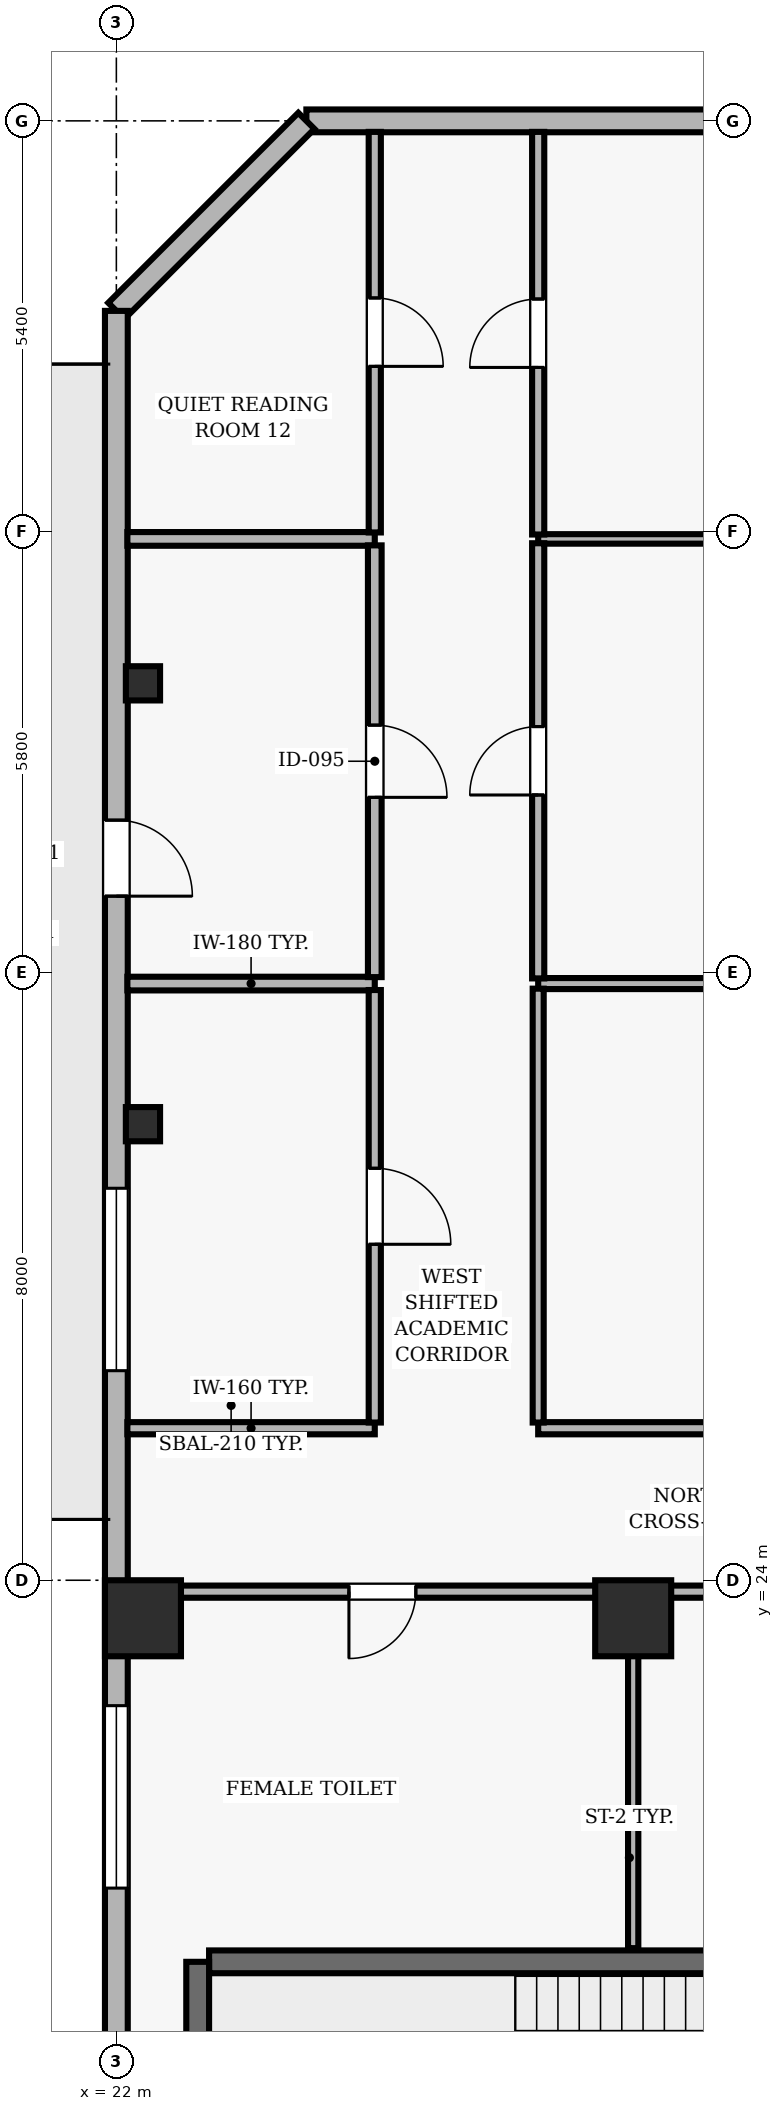
"""IFC4 building model, lengths in metres.
Left out: names, types, materials, properties, quantities, classifications, styles, units other than length and angle.
Written with IfcOpenShell. Run it as: python <this file> out.ifc"""

import sys

from ifc_helpers import new_model, si_unit, direction, frame, frame_2d, origin, origin_2d, place, context, subcontext, project, spatial, rectangle, hollow_rectangle, extrude, element, fill, save


model = new_model("IFC4")
c1 = context("Model", 3, precision=1e-05, world=origin(), true_north=direction((0.0, 1.0)))
c2 = subcontext(c1, "Body", "Model", "MODEL_VIEW")
j1 = project(units=[si_unit("LENGTHUNIT", "METRE"), si_unit("PLANEANGLEUNIT", "RADIAN")], contexts=[c1])
p1 = place(None, origin())
s1 = spatial("IfcSite", under=j1, at=p1, CompositionType="ELEMENT")
p2 = place(p1, origin())
s2 = spatial("IfcBuilding", under=s1, at=p2, CompositionType="ELEMENT")
p3 = place(p2, frame((0.0, 0.0, 179.7)))
s3 = spatial("IfcBuildingStorey", under=s2, at=p3, CompositionType="ELEMENT", Elevation=179.7)
for number, where, z_axis, x_axis in (
    (1, (22.35, 23.5, 0.0), (0.0, 0.0, 1.0), (1.0, 0.0, 0.0)),
    (2, (28.8, 23.5, 0.0), (0.0, 0.0, 1.0), (1.0, 0.0, 0.0)),
):
    element("IfcColumn", number, at=place(p3, frame(where, z_axis=z_axis, x_axis=x_axis)), inside=s3, PredefinedType="COLUMN", context=c2, shape_type="SweptSolid", body=[
        extrude(rectangle(XDim=1.0, YDim=1.0, at=origin_2d()), origin(), (0.0, 0.0, 1.0), 3.9),
    ])
for number, where, z_axis, x_axis in (
    (3, (22.35, 30.0, 0.0), (0.0, 0.0, 1.0), (1.0, 0.0, 0.0)),
    (4, (22.35, 35.8, 0.0), (0.0, 0.0, 1.0), (1.0, 0.0, 0.0)),
):
    element("IfcColumn", number, at=place(p3, frame(where, z_axis=z_axis, x_axis=x_axis)), inside=s3, PredefinedType="COLUMN", context=c2, shape_type="SweptSolid", body=[
        extrude(hollow_rectangle(XDim=0.45, YDim=0.45, WallThickness=0.02, at=origin_2d()), origin(), (0.0, 0.0, 1.0), 3.9),
    ])
p4 = place(p3, frame((35.5, 43.2, 0.0), z_axis=(0.0, 0.0, 1.0), x_axis=(-1.0, 0.0, 0.0)))
e5 = element("IfcWall", 5, at=p4, inside=s3, PredefinedType="SOLIDWALL", context=c2, shape_type="SweptSolid", body=[
    extrude(rectangle(XDim=11.0, YDim=0.3, at=frame_2d((5.5, 0.0))), origin(), (0.0, 0.0, 1.0), 3.69),
])
p5 = place(p4, frame((2.0, 0.0, 0.9)))
e6 = element("IfcOpeningElement", 6, at=p5, cuts=e5, PredefinedType="OPENING", context=c2, shape_type="SweptSolid", body=[
    extrude(rectangle(XDim=1.5, YDim=1.8, at=frame_2d((0.75, 0.9))), frame((0.0, 0.16, 0.0), z_axis=(0.0, -1.0, 0.0), x_axis=(1.0, 0.0, 0.0)), (0.0, 0.0, 1.0), 0.32),
])
p6 = place(p3, frame((24.5, 43.2, 0.0), z_axis=(0.0, 0.0, 1.0), x_axis=(-0.707106781187, -0.707106781187, 0.0)))
e7 = element("IfcWall", 7, at=p6, inside=s3, PredefinedType="SOLIDWALL", context=c2, shape_type="SweptSolid", body=[
    extrude(rectangle(XDim=3.536, YDim=0.3, at=frame_2d((1.768, 0.0))), origin(), (0.0, 0.0, 1.0), 3.69),
])
p7 = place(p3, frame((22.0, 40.7, 0.0), z_axis=(0.0, 0.0, 1.0), x_axis=(0.0, -1.0, 0.0)))
e8 = element("IfcWall", 8, at=p7, inside=s3, PredefinedType="SOLIDWALL", context=c2, shape_type="SweptSolid", body=[
    extrude(rectangle(XDim=38.2, YDim=0.3, at=frame_2d((19.1, 0.0))), origin(), (0.0, 0.0, 1.0), 3.69),
])
p8 = place(p7, frame((6.7, 0.0, 0.0)))
e9 = element("IfcOpeningElement", 9, at=p8, cuts=e8, PredefinedType="OPENING", context=c2, shape_type="SweptSolid", body=[
    extrude(rectangle(XDim=1.0, YDim=2.2, at=frame_2d((0.5, 1.1))), frame((0.0, 0.16, 0.0), z_axis=(0.0, -1.0, 0.0), x_axis=(1.0, 0.0, 0.0)), (0.0, 0.0, 1.0), 0.32),
])
p9 = place(p7, frame((11.543, 0.0, 0.9)))
e10 = element("IfcOpeningElement", 10, at=p9, cuts=e8, PredefinedType="OPENING", context=c2, shape_type="SweptSolid", body=[
    extrude(rectangle(XDim=2.4, YDim=1.8, at=frame_2d((1.2, 0.9))), frame((0.0, 0.16, 0.0), z_axis=(0.0, -1.0, 0.0), x_axis=(1.0, 0.0, 0.0)), (0.0, 0.0, 1.0), 0.32),
])
p10 = place(p7, frame((18.35, 0.0, 0.9)))
e11 = element("IfcOpeningElement", 11, at=p10, cuts=e8, PredefinedType="OPENING", context=c2, shape_type="SweptSolid", body=[
    extrude(rectangle(XDim=2.4, YDim=1.8, at=frame_2d((1.2, 0.9))), frame((0.0, 0.16, 0.0), z_axis=(0.0, -1.0, 0.0), x_axis=(1.0, 0.0, 0.0)), (0.0, 0.0, 1.0), 0.32),
])
p11 = place(p7, frame((22.907, 0.0, 0.9)))
e12 = element("IfcOpeningElement", 12, at=p11, cuts=e8, PredefinedType="OPENING", context=c2, shape_type="SweptSolid", body=[
    extrude(rectangle(XDim=2.4, YDim=1.8, at=frame_2d((1.2, 0.9))), frame((0.0, 0.16, 0.0), z_axis=(0.0, -1.0, 0.0), x_axis=(1.0, 0.0, 0.0)), (0.0, 0.0, 1.0), 0.32),
])
p12 = place(p7, frame((28.814, 0.0, 0.9)))
e13 = element("IfcOpeningElement", 13, at=p12, cuts=e8, PredefinedType="OPENING", context=c2, shape_type="SweptSolid", body=[
    extrude(rectangle(XDim=2.4, YDim=1.8, at=frame_2d((1.2, 0.9))), frame((0.0, 0.16, 0.0), z_axis=(0.0, -1.0, 0.0), x_axis=(1.0, 0.0, 0.0)), (0.0, 0.0, 1.0), 0.32),
])
p13 = place(p3, frame((31.58, 18.98, 0.0), z_axis=(0.0, 0.0, 1.0), x_axis=(-1.0, 0.0, 0.0)))
e14 = element("IfcWall", 14, at=p13, inside=s3, PredefinedType="SHEAR", context=c2, shape_type="SweptSolid", body=[
    extrude(rectangle(XDim=8.36, YDim=0.3, at=frame_2d((4.18, 0.0))), origin(), (0.0, 0.0, 1.0), 3.69),
])
p14 = place(p3, frame((23.07, 18.98, 0.0), z_axis=(0.0, 0.0, 1.0), x_axis=(0.0, -1.0, 0.0)))
e15 = element("IfcWall", 15, at=p14, inside=s3, PredefinedType="SHEAR", context=c2, shape_type="SweptSolid", body=[
    extrude(rectangle(XDim=3.51, YDim=0.3, at=frame_2d((1.755, 0.0))), origin(), (0.0, 0.0, 1.0), 3.69),
])
p15 = place(p3, frame((25.4, 26.0, 0.0), z_axis=(0.0, 0.0, 1.0), x_axis=(-1.0, 0.0, 0.0)))
e16 = element("IfcWall", 16, at=p15, inside=s3, PredefinedType="PARTITIONING", context=c2, shape_type="SweptSolid", body=[
    extrude(rectangle(XDim=3.255, YDim=0.16, at=frame_2d((1.627, 0.0))), origin(), (0.0, 0.0, 1.0), 3.69),
])
for number, where, z_axis, x_axis in (
    (17, (25.4, 31.85, 0.0), (0.0, 0.0, 1.0), (-1.0, 0.0, 0.0)),
    (18, (25.4, 37.7, 0.0), (0.0, 0.0, 1.0), (-1.0, 0.0, 0.0)),
):
    element("IfcWall", number, at=place(p3, frame(where, z_axis=z_axis, x_axis=x_axis)), inside=s3, PredefinedType="PARTITIONING", context=c2, shape_type="SweptSolid", body=[
        extrude(rectangle(XDim=3.255, YDim=0.18, at=frame_2d((1.627, 0.0))), origin(), (0.0, 0.0, 1.0), 3.69),
    ])
p16 = place(p3, frame((28.8, 23.85, 0.0), z_axis=(0.0, 0.0, 1.0), x_axis=(-1.0, 0.0, 0.0)))
e19 = element("IfcWall", 19, at=p16, inside=s3, PredefinedType="PARTITIONING", context=c2, shape_type="SweptSolid", body=[
    extrude(rectangle(XDim=6.6, YDim=0.16, at=frame_2d((3.3, 0.0))), origin(), (0.0, 0.0, 1.0), 3.146),
])
p17 = place(p16, frame((2.86, 0.0, 0.0)))
e20 = element("IfcOpeningElement", 20, at=p17, cuts=e19, PredefinedType="OPENING", context=c2, shape_type="SweptSolid", body=[
    extrude(rectangle(XDim=0.88, YDim=2.1, at=frame_2d((0.44, 1.05))), frame((0.0, 0.09, 0.0), z_axis=(0.0, -1.0, 0.0), x_axis=(1.0, 0.0, 0.0)), (0.0, 0.0, 1.0), 0.18),
])
p18 = place(p3, frame((31.65, 23.85, 0.0), z_axis=(0.0, 0.0, 1.0), x_axis=(-1.0, 0.0, 0.0)))
e21 = element("IfcWall", 21, at=p18, inside=s3, PredefinedType="PARTITIONING", context=c2, shape_type="SweptSolid", body=[
    extrude(rectangle(XDim=2.85, YDim=0.16, at=frame_2d((1.425, 0.0))), origin(), (0.0, 0.0, 1.0), 3.146),
])
p19 = place(p3, frame((37.85, 26.0, 0.0), z_axis=(0.0, 0.0, 1.0), x_axis=(-1.0, 0.0, 0.0)))
e22 = element("IfcWall", 22, at=p19, inside=s3, PredefinedType="PARTITIONING", context=c2, shape_type="SweptSolid", body=[
    extrude(rectangle(XDim=10.3, YDim=0.16, at=frame_2d((5.15, 0.0))), origin(), (0.0, 0.0, 1.0), 3.69),
])
p20 = place(p19, frame((4.6, 0.0, 0.0)))
e23 = element("IfcOpeningElement", 23, at=p20, cuts=e22, PredefinedType="OPENING", context=c2, shape_type="SweptSolid", body=[
    extrude(rectangle(XDim=1.1, YDim=2.15, at=frame_2d((0.55, 1.075))), frame((0.0, 0.09, 0.0), z_axis=(0.0, -1.0, 0.0), x_axis=(1.0, 0.0, 0.0)), (0.0, 0.0, 1.0), 0.18),
])
p21 = place(p3, frame((37.85, 31.85, 0.0), z_axis=(0.0, 0.0, 1.0), x_axis=(-1.0, 0.0, 0.0)))
e24 = element("IfcWall", 24, at=p21, inside=s3, PredefinedType="PARTITIONING", context=c2, shape_type="SweptSolid", body=[
    extrude(rectangle(XDim=10.3, YDim=0.145, at=frame_2d((5.15, 0.0))), origin(), (0.0, 0.0, 1.0), 3.69),
])
p22 = place(p3, frame((37.85, 37.7, 0.0), z_axis=(0.0, 0.0, 1.0), x_axis=(-1.0, 0.0, 0.0)))
e25 = element("IfcWall", 25, at=p22, inside=s3, PredefinedType="PARTITIONING", context=c2, shape_type="SweptSolid", body=[
    extrude(rectangle(XDim=10.3, YDim=0.125, at=frame_2d((5.15, 0.0))), origin(), (0.0, 0.0, 1.0), 3.69),
])
p23 = place(p3, frame((25.4, 31.765, 0.0), z_axis=(0.0, 0.0, 1.0), x_axis=(0.0, -1.0, 0.0)))
e26 = element("IfcWall", 26, at=p23, inside=s3, PredefinedType="PARTITIONING", context=c2, shape_type="SweptSolid", body=[
    extrude(rectangle(XDim=5.69, YDim=0.16, at=frame_2d((2.845, 0.0))), origin(), (0.0, 0.0, 1.0), 3.69),
])
p24 = place(p23, frame((2.345, 0.0, 0.0)))
e27 = element("IfcOpeningElement", 27, at=p24, cuts=e26, PredefinedType="OPENING", context=c2, shape_type="SweptSolid", body=[
    extrude(rectangle(XDim=1.0, YDim=2.1, at=frame_2d((0.5, 1.05))), frame((0.0, 0.09, 0.0), z_axis=(0.0, -1.0, 0.0), x_axis=(1.0, 0.0, 0.0)), (0.0, 0.0, 1.0), 0.18),
])
p25 = place(p3, frame((25.4, 37.615, 0.0), z_axis=(0.0, 0.0, 1.0), x_axis=(0.0, -1.0, 0.0)))
e28 = element("IfcWall", 28, at=p25, inside=s3, PredefinedType="PARTITIONING", context=c2, shape_type="SweptSolid", body=[
    extrude(rectangle(XDim=5.68, YDim=0.18, at=frame_2d((2.84, 0.0))), origin(), (0.0, 0.0, 1.0), 3.69),
])
p26 = place(p25, frame((2.365, 0.0, 0.0)))
e29 = element("IfcOpeningElement", 29, at=p26, cuts=e28, PredefinedType="OPENING", context=c2, shape_type="SweptSolid", body=[
    extrude(rectangle(XDim=0.95, YDim=2.1, at=frame_2d((0.475, 1.05))), frame((0.0, 0.1, 0.0), z_axis=(0.0, -1.0, 0.0), x_axis=(1.0, 0.0, 0.0)), (0.0, 0.0, 1.0), 0.2),
])
p27 = place(p3, frame((25.4, 43.055, 0.0), z_axis=(0.0, 0.0, 1.0), x_axis=(0.0, -1.0, 0.0)))
e30 = element("IfcWall", 30, at=p27, inside=s3, PredefinedType="PARTITIONING", context=c2, shape_type="SweptSolid", body=[
    extrude(rectangle(XDim=5.27, YDim=0.16, at=frame_2d((2.635, 0.0))), origin(), (0.0, 0.0, 1.0), 3.69),
])
p28 = place(p27, frame((2.185, 0.0, 0.0)))
e31 = element("IfcOpeningElement", 31, at=p28, cuts=e30, PredefinedType="OPENING", context=c2, shape_type="SweptSolid", body=[
    extrude(rectangle(XDim=0.9, YDim=2.1, at=frame_2d((0.45, 1.05))), frame((0.0, 0.09, 0.0), z_axis=(0.0, -1.0, 0.0), x_axis=(1.0, 0.0, 0.0)), (0.0, 0.0, 1.0), 0.18),
])
p29 = place(p3, frame((27.55, 26.075, 0.0), z_axis=(0.0, 0.0, 1.0), x_axis=(0.0, 1.0, 0.0)))
e32 = element("IfcWall", 32, at=p29, inside=s3, PredefinedType="PARTITIONING", context=c2, shape_type="SweptSolid", body=[
    extrude(rectangle(XDim=5.708, YDim=0.145, at=frame_2d((2.854, 0.0))), origin(), (0.0, 0.0, 1.0), 3.69),
])
p30 = place(p3, frame((27.55, 31.918, 0.0), z_axis=(0.0, 0.0, 1.0), x_axis=(0.0, 1.0, 0.0)))
e33 = element("IfcWall", 33, at=p30, inside=s3, PredefinedType="PARTITIONING", context=c2, shape_type="SweptSolid", body=[
    extrude(rectangle(XDim=5.725, YDim=0.16, at=frame_2d((2.863, 0.0))), origin(), (0.0, 0.0, 1.0), 3.69),
])
p31 = place(p30, frame((2.413, 0.0, 0.0)))
e34 = element("IfcOpeningElement", 34, at=p31, cuts=e33, PredefinedType="OPENING", context=c2, shape_type="SweptSolid", body=[
    extrude(rectangle(XDim=0.9, YDim=2.1, at=frame_2d((0.45, 1.05))), frame((0.0, 0.09, 0.0), z_axis=(0.0, -1.0, 0.0), x_axis=(1.0, 0.0, 0.0)), (0.0, 0.0, 1.0), 0.18),
])
p32 = place(p3, frame((27.55, 37.758, 0.0), z_axis=(0.0, 0.0, 1.0), x_axis=(0.0, 1.0, 0.0)))
e35 = element("IfcWall", 35, at=p32, inside=s3, PredefinedType="PARTITIONING", context=c2, shape_type="SweptSolid", body=[
    extrude(rectangle(XDim=5.297, YDim=0.16, at=frame_2d((2.648, 0.0))), origin(), (0.0, 0.0, 1.0), 3.69),
])
p33 = place(p32, frame((2.198, 0.0, 0.0)))
e36 = element("IfcOpeningElement", 36, at=p33, cuts=e35, PredefinedType="OPENING", context=c2, shape_type="SweptSolid", body=[
    extrude(rectangle(XDim=0.9, YDim=2.1, at=frame_2d((0.45, 1.05))), frame((0.0, 0.09, 0.0), z_axis=(0.0, -1.0, 0.0), x_axis=(1.0, 0.0, 0.0)), (0.0, 0.0, 1.0), 0.18),
])
p34 = place(p3, frame((28.8, 23.775, 0.0), z_axis=(0.0, 0.0, 1.0), x_axis=(0.0, -1.0, 0.0)))
e37 = element("IfcWall", 37, at=p34, inside=s3, PredefinedType="PARTITIONING", context=c2, shape_type="SweptSolid", body=[
    extrude(rectangle(XDim=4.615, YDim=0.135, at=frame_2d((2.308, 0.0))), origin(), (0.0, 0.0, 1.0), 3.69),
])
p35 = place(p8, origin())
e38 = element("IfcDoor", 38, at=p35, inside=s3, OperationType="SINGLE_SWING_RIGHT", PredefinedType="DOOR", context=c2, shape_type="SweptSolid", body=[
    extrude(rectangle(XDim=1.0, YDim=2.2, at=frame_2d((0.5, 1.1))), frame((0.0, 0.025, 0.0), z_axis=(0.0, -1.0, 0.0), x_axis=(1.0, 0.0, 0.0)), (0.0, 0.0, 1.0), 0.05),
])
fill(e9, e38)
p36 = place(p9, origin())
e39 = element("IfcWindow", 39, at=p36, inside=s3, PartitioningType="SINGLE_PANEL", PredefinedType="WINDOW", context=c2, shape_type="SweptSolid", body=[
    extrude(rectangle(XDim=2.4, YDim=1.8, at=frame_2d((1.2, 0.9))), frame((0.0, 0.03, 0.0), z_axis=(0.0, -1.0, 0.0), x_axis=(1.0, 0.0, 0.0)), (0.0, 0.0, 1.0), 0.06),
])
fill(e10, e39)
p37 = place(p10, origin())
e40 = element("IfcWindow", 40, at=p37, inside=s3, PartitioningType="SINGLE_PANEL", PredefinedType="WINDOW", context=c2, shape_type="SweptSolid", body=[
    extrude(rectangle(XDim=2.4, YDim=1.8, at=frame_2d((1.2, 0.9))), frame((0.0, 0.03, 0.0), z_axis=(0.0, -1.0, 0.0), x_axis=(1.0, 0.0, 0.0)), (0.0, 0.0, 1.0), 0.06),
])
fill(e11, e40)
p38 = place(p17, origin())
e41 = element("IfcDoor", 41, at=p38, inside=s3, OperationType="SINGLE_SWING_RIGHT", PredefinedType="DOOR", context=c2, shape_type="SweptSolid", body=[
    extrude(rectangle(XDim=0.88, YDim=2.1, at=frame_2d((0.44, 1.05))), frame((0.0, 0.025, 0.0), z_axis=(0.0, -1.0, 0.0), x_axis=(1.0, 0.0, 0.0)), (0.0, 0.0, 1.0), 0.05),
])
fill(e20, e41)
p39 = place(p24, origin())
e42 = element("IfcDoor", 42, at=p39, inside=s3, OperationType="SINGLE_SWING_RIGHT", PredefinedType="DOOR", context=c2, shape_type="SweptSolid", body=[
    extrude(rectangle(XDim=1.0, YDim=2.1, at=frame_2d((0.5, 1.05))), frame((0.0, 0.025, 0.0), z_axis=(0.0, -1.0, 0.0), x_axis=(1.0, 0.0, 0.0)), (0.0, 0.0, 1.0), 0.05),
])
fill(e27, e42)
p40 = place(p26, origin())
e43 = element("IfcDoor", 43, at=p40, inside=s3, OperationType="SINGLE_SWING_RIGHT", PredefinedType="DOOR", context=c2, shape_type="SweptSolid", body=[
    extrude(rectangle(XDim=0.95, YDim=2.1, at=frame_2d((0.475, 1.05))), frame((0.0, 0.025, 0.0), z_axis=(0.0, -1.0, 0.0), x_axis=(1.0, 0.0, 0.0)), (0.0, 0.0, 1.0), 0.05),
])
fill(e29, e43)
p41 = place(p31, origin())
e44 = element("IfcDoor", 44, at=p41, inside=s3, OperationType="SINGLE_SWING_LEFT", PredefinedType="DOOR", context=c2, shape_type="SweptSolid", body=[
    extrude(rectangle(XDim=0.9, YDim=2.1, at=frame_2d((0.45, 1.05))), frame((0.0, 0.025, 0.0), z_axis=(0.0, -1.0, 0.0), x_axis=(1.0, 0.0, 0.0)), (0.0, 0.0, 1.0), 0.05),
])
fill(e34, e44)
p42 = place(p28, origin())
e45 = element("IfcDoor", 45, at=p42, inside=s3, OperationType="SINGLE_SWING_RIGHT", PredefinedType="DOOR", context=c2, shape_type="SweptSolid", body=[
    extrude(rectangle(XDim=0.9, YDim=2.1, at=frame_2d((0.45, 1.05))), frame((0.0, 0.025, 0.0), z_axis=(0.0, -1.0, 0.0), x_axis=(1.0, 0.0, 0.0)), (0.0, 0.0, 1.0), 0.05),
])
fill(e31, e45)
p43 = place(p33, origin())
e46 = element("IfcDoor", 46, at=p43, inside=s3, OperationType="SINGLE_SWING_LEFT", PredefinedType="DOOR", context=c2, shape_type="SweptSolid", body=[
    extrude(rectangle(XDim=0.9, YDim=2.1, at=frame_2d((0.45, 1.05))), frame((0.0, 0.025, 0.0), z_axis=(0.0, -1.0, 0.0), x_axis=(1.0, 0.0, 0.0)), (0.0, 0.0, 1.0), 0.05),
])
fill(e36, e46)
save(model, sys.argv[1])
